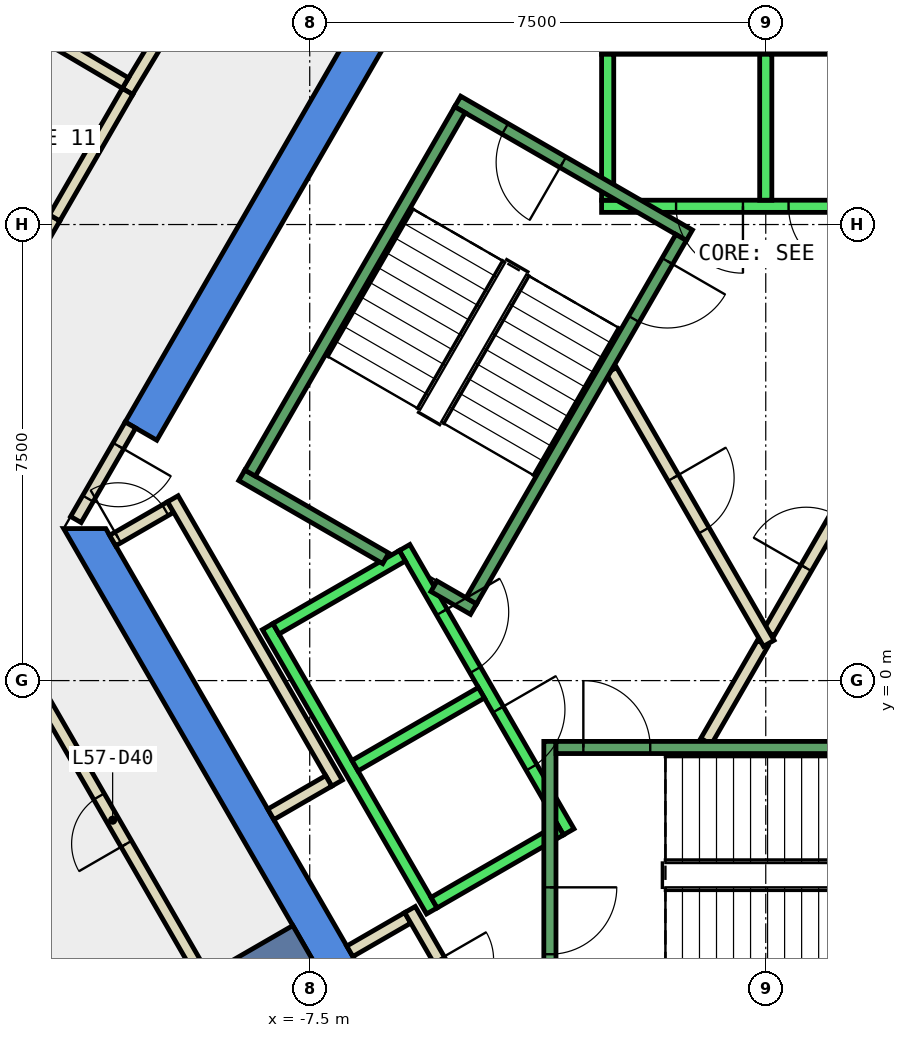
"""IFC4 building model, lengths in metres.
Left out: names, types, materials, properties, quantities, classifications, styles, units other than length and angle.
Written with IfcOpenShell. Run it as: python <this file> out.ifc"""

import sys

from ifc_helpers import new_model, si_unit, direction, frame, frame_2d, origin, place, context, subcontext, project, spatial, polyline, rectangle, outline, extrude, element, fill, save


model = new_model("IFC4")
c1 = context("Model", 3, precision=1e-05, world=origin(), true_north=direction((0.0, 1.0)))
c2 = subcontext(c1, "Body", "Model", "MODEL_VIEW")
j1 = project(units=[si_unit("LENGTHUNIT", "METRE"), si_unit("PLANEANGLEUNIT", "RADIAN")], contexts=[c1])
p1 = place(None, origin())
s1 = spatial("IfcSite", under=j1, at=p1, CompositionType="ELEMENT")
p2 = place(p1, origin())
s2 = spatial("IfcBuilding", under=s1, at=p2, CompositionType="ELEMENT")
p3 = place(p2, frame((0.0, 0.0, 252.2)))
s3 = spatial("IfcBuildingStorey", under=s2, at=p3, CompositionType="ELEMENT", Elevation=252.2)
p4 = place(p3, frame((0.0, 0.0, -0.34)))
e1 = element("IfcWall", 1, at=p4, inside=s3, PredefinedType="SHEAR", context=c2, shape_type="SweptSolid", body=[
    extrude(outline(polyline([(-10.535, 4.253), (-10.015, 3.953), (-5.427, 11.9), (-5.774, 12.5), (-10.535, 4.253)])), origin(), (0.0, 0.0, 1.0), 3.6),
])
p5 = place(p3, frame((0.0, 0.0, -0.34)))
e2 = element("IfcWall", 2, at=p5, inside=s3, PredefinedType="SHEAR", context=c2, shape_type="SweptSolid", body=[
    extrude(outline(polyline([(-11.547, 2.5), (-5.774, -7.5), (-5.427, -6.9), (-10.854, 2.5), (-11.547, 2.5)])), origin(), (0.0, 0.0, 1.0), 3.6),
])
p6 = place(p3, frame((-7.578, -4.375, -0.34), z_axis=(0.0, 0.0, 1.0), x_axis=(-0.866024315419, -0.5000018851, 0.0)))
e3 = element("IfcWall", 3, at=p6, inside=s3, PredefinedType="SHEAR", context=c2, shape_type="SweptSolid", body=[
    extrude(rectangle(XDim=9.0, YDim=0.8, at=frame_2d((4.5, 0.0))), origin(), (0.0, 0.0, 1.0), 3.6),
])
p7 = place(p3, frame((-10.498, 9.689, 0.0), z_axis=(0.0, 0.0, 1.0), x_axis=(0.516353342298, 0.856375633643, 0.0)))
e4 = element("IfcWall", 4, at=p7, inside=s3, PredefinedType="PARTITIONING", context=c2, shape_type="SweptSolid", body=[
    extrude(rectangle(XDim=4.288, YDim=0.2, at=frame_2d((2.144, 0.0))), origin(), (0.0, 0.0, 1.0), 3.26),
])
p8 = place(p7, frame((1.694, 0.0, 0.0)))
e5 = element("IfcOpeningElement", 5, at=p8, cuts=e4, PredefinedType="OPENING", context=c2, shape_type="SweptSolid", body=[
    extrude(rectangle(XDim=1.0, YDim=2.1, at=frame_2d((0.5, 1.05))), frame((0.0, 0.11, 0.0), z_axis=(0.0, -1.0, 0.0), x_axis=(1.0, 0.0, 0.0)), (0.0, 0.0, 1.0), 0.22),
])
p9 = place(p3, frame((-13.652, 4.224, 0.0), z_axis=(0.0, 0.0, 1.0), x_axis=(0.500221427001, 0.865897525097, 0.0)))
e6 = element("IfcWall", 6, at=p9, inside=s3, PredefinedType="PARTITIONING", context=c2, shape_type="SweptSolid", body=[
    extrude(rectangle(XDim=3.91, YDim=0.2, at=frame_2d((1.955, 0.0))), origin(), (0.0, 0.0, 1.0), 3.26),
])
p10 = place(p9, frame((1.505, 0.0, 0.0)))
e7 = element("IfcOpeningElement", 7, at=p10, cuts=e6, PredefinedType="OPENING", context=c2, shape_type="SweptSolid", body=[
    extrude(rectangle(XDim=1.0, YDim=2.1, at=frame_2d((0.5, 1.05))), frame((0.0, 0.11, 0.0), z_axis=(0.0, -1.0, 0.0), x_axis=(1.0, 0.0, 0.0)), (0.0, 0.0, 1.0), 0.22),
])
p11 = place(p3, frame((-11.696, 7.61, 0.0), z_axis=(0.0, 0.0, 1.0), x_axis=(0.500089422704, 0.865973769406, 0.0)))
e8 = element("IfcWall", 8, at=p11, inside=s3, PredefinedType="PARTITIONING", context=c2, shape_type="SweptSolid", body=[
    extrude(rectangle(XDim=2.399, YDim=0.2, at=frame_2d((1.2, 0.0))), origin(), (0.0, 0.0, 1.0), 3.26),
])
p12 = place(p3, frame((-10.741, 2.303, 0.0), z_axis=(0.0, 0.0, 1.0), x_axis=(0.866063652425, 0.499933745558, 0.0)))
e9 = element("IfcWall", 9, at=p12, inside=s3, PredefinedType="PARTITIONING", context=c2, shape_type="SweptSolid", body=[
    extrude(rectangle(XDim=1.1, YDim=0.2, at=frame_2d((0.55, 0.0))), origin(), (0.0, 0.0, 1.0), 3.26),
])
p13 = place(p12, frame((0.1, 0.0, 0.0)))
e10 = element("IfcOpeningElement", 10, at=p13, cuts=e9, PredefinedType="OPENING", context=c2, shape_type="SweptSolid", body=[
    extrude(rectangle(XDim=0.9, YDim=2.1, at=frame_2d((0.45, 1.05))), frame((0.0, 0.11, 0.0), z_axis=(0.0, -1.0, 0.0), x_axis=(1.0, 0.0, 0.0)), (0.0, 0.0, 1.0), 0.22),
])
p14 = place(p3, frame((-9.751, 2.99, 0.0), z_axis=(0.0, 0.0, 1.0), x_axis=(0.499955951776, -0.866050833545, 0.0)))
e11 = element("IfcWall", 11, at=p14, inside=s3, PredefinedType="PARTITIONING", context=c2, shape_type="SweptSolid", body=[
    extrude(rectangle(XDim=5.4, YDim=0.2, at=frame_2d((2.7, 0.0))), origin(), (0.0, 0.0, 1.0), 3.26),
])
p15 = place(p3, frame((-7.188, -1.65, 0.0), z_axis=(0.0, 0.0, 1.0), x_axis=(-0.865841558281, -0.500318294642, 0.0)))
e12 = element("IfcWall", 12, at=p15, inside=s3, PredefinedType="PARTITIONING", context=c2, shape_type="SweptSolid", body=[
    extrude(rectangle(XDim=1.099, YDim=0.2, at=frame_2d((0.55, 0.0))), origin(), (0.0, 0.0, 1.0), 3.26),
])
p16 = place(p3, frame((-6.841, -4.452, 0.0), z_axis=(0.0, 0.0, 1.0), x_axis=(0.86621513555, 0.499671230855, 0.0)))
e13 = element("IfcWall", 13, at=p16, inside=s3, PredefinedType="PARTITIONING", context=c2, shape_type="SweptSolid", body=[
    extrude(rectangle(XDim=1.1, YDim=0.2, at=frame_2d((0.55, 0.0))), origin(), (0.0, 0.0, 1.0), 3.26),
])
p17 = place(p3, frame((-5.851, -3.765, 0.0), z_axis=(0.0, 0.0, 1.0), x_axis=(0.500011755427, -0.866018616679, 0.0)))
e14 = element("IfcWall", 14, at=p17, inside=s3, PredefinedType="PARTITIONING", context=c2, shape_type="SweptSolid", body=[
    extrude(rectangle(XDim=2.8, YDim=0.2, at=frame_2d((1.4, 0.0))), origin(), (0.0, 0.0, 1.0), 3.26),
])
p18 = place(p17, frame((0.95, 0.0, 0.0)))
e15 = element("IfcOpeningElement", 15, at=p18, cuts=e14, PredefinedType="OPENING", context=c2, shape_type="SweptSolid", body=[
    extrude(rectangle(XDim=0.9, YDim=2.1, at=frame_2d((0.45, 1.05))), frame((0.0, 0.11, 0.0), z_axis=(0.0, -1.0, 0.0), x_axis=(1.0, 0.0, 0.0)), (0.0, 0.0, 1.0), 0.22),
])
p19 = place(p3, frame((-0.982, -1.0, 0.0), z_axis=(0.0, 0.0, 1.0), x_axis=(0.50024047865, 0.865886518847, 0.0)))
e16 = element("IfcWall", 16, at=p19, inside=s3, PredefinedType="PARTITIONING", context=c2, shape_type="SweptSolid", body=[
    extrude(rectangle(XDim=1.863, YDim=0.2, at=frame_2d((0.931, 0.0))), origin(), (0.0, 0.0, 1.0), 3.26),
])
p20 = place(p3, frame((0.05, 0.787, 0.0), z_axis=(0.0, 0.0, 1.0), x_axis=(0.499954076797, 0.866051915934, 0.0)))
e17 = element("IfcWall", 17, at=p20, inside=s3, PredefinedType="PARTITIONING", context=c2, shape_type="SweptSolid", body=[
    extrude(rectangle(XDim=3.558, YDim=0.2, at=frame_2d((1.779, 0.0))), origin(), (0.0, 0.0, 1.0), 3.26),
])
p21 = place(p20, frame((1.229, 0.0, 0.0)))
e18 = element("IfcOpeningElement", 18, at=p21, cuts=e17, PredefinedType="OPENING", context=c2, shape_type="SweptSolid", body=[
    extrude(rectangle(XDim=1.0, YDim=2.1, at=frame_2d((0.5, 1.05))), frame((0.0, 0.11, 0.0), z_axis=(0.0, -1.0, 0.0), x_axis=(1.0, 0.0, 0.0)), (0.0, 0.0, 1.0), 0.22),
])
p22 = place(p3, frame((-2.54, 5.1, 0.0), z_axis=(0.0, 0.0, 1.0), x_axis=(0.499925051871, -0.866068670783, 0.0)))
e19 = element("IfcWall", 19, at=p22, inside=s3, PredefinedType="PARTITIONING", context=c2, shape_type="SweptSolid", body=[
    extrude(rectangle(XDim=5.181, YDim=0.2, at=frame_2d((2.59, 0.0))), origin(), (0.0, 0.0, 1.0), 3.26),
])
p23 = place(p22, frame((2.04, 0.0, 0.0)))
e20 = element("IfcOpeningElement", 20, at=p23, cuts=e19, PredefinedType="OPENING", context=c2, shape_type="SweptSolid", body=[
    extrude(rectangle(XDim=1.0, YDim=2.1, at=frame_2d((0.5, 1.05))), frame((0.0, 0.11, 0.0), z_axis=(0.0, -1.0, 0.0), x_axis=(1.0, 0.0, 0.0)), (0.0, 0.0, 1.0), 0.22),
])
p24 = place(p3, frame((-10.532, 9.826, 0.0), z_axis=(0.0, 0.0, 1.0), x_axis=(-0.861311086958, 0.508077958077, 0.0)))
e21 = element("IfcWall", 21, at=p24, inside=s3, PredefinedType="PARTITIONING", context=c2, shape_type="SweptSolid", body=[
    extrude(rectangle(XDim=2.299, YDim=0.2, at=frame_2d((1.149, 0.0))), origin(), (0.0, 0.0, 1.0), 3.26),
])
p25 = place(p3, frame((-10.449, 4.203, 0.0), z_axis=(0.0, 0.0, 1.0), x_axis=(-0.499914839587, -0.866074565589, 0.0)))
e22 = element("IfcWall", 22, at=p25, inside=s3, PredefinedType="PARTITIONING", context=c2, shape_type="SweptSolid", body=[
    extrude(rectangle(XDim=1.794, YDim=0.2, at=frame_2d((0.897, 0.0))), origin(), (0.0, 0.0, 1.0), 2.4),
])
p26 = place(p25, frame((0.397, 0.0, 0.0)))
e23 = element("IfcOpeningElement", 23, at=p26, cuts=e22, PredefinedType="OPENING", context=c2, shape_type="SweptSolid", body=[
    extrude(rectangle(XDim=1.0, YDim=2.1, at=frame_2d((0.5, 1.05))), frame((0.0, 0.11, 0.0), z_axis=(0.0, -1.0, 0.0), x_axis=(1.0, 0.0, 0.0)), (0.0, 0.0, 1.0), 0.22),
])
p27 = place(p3, frame((-9.25, -4.879, 0.0), z_axis=(0.0, 0.0, 1.0), x_axis=(-0.499944124422, 0.866057661161, 0.0)))
e24 = element("IfcWall", 24, at=p27, inside=s3, PredefinedType="PARTITIONING", context=c2, shape_type="SweptSolid", body=[
    extrude(rectangle(XDim=7.405, YDim=0.2, at=frame_2d((3.702, 0.0))), origin(), (0.0, 0.0, 1.0), 3.26),
])
p28 = place(p27, frame((2.533, 0.0, 0.0)))
e25 = element("IfcOpeningElement", 25, at=p28, cuts=e24, PredefinedType="OPENING", context=c2, shape_type="SweptSolid", body=[
    extrude(rectangle(XDim=0.9, YDim=2.1, at=frame_2d((0.45, 1.05))), frame((0.0, 0.11, 0.0), z_axis=(0.0, -1.0, 0.0), x_axis=(1.0, 0.0, 0.0)), (0.0, 0.0, 1.0), 0.22),
])
p29 = place(p3, frame((2.7, 7.8, 0.0), z_axis=(0.0, 0.0, 1.0), x_axis=(-1.0, 0.0, 0.0)))
e26 = element("IfcWall", 26, at=p29, inside=s3, PredefinedType="STANDARD", context=c2, shape_type="SweptSolid", body=[
    extrude(rectangle(XDim=5.4, YDim=0.2, at=frame_2d((2.7, 0.0))), origin(), (0.0, 0.0, 1.0), 3.26),
])
p30 = place(p29, frame((1.225, 0.0, 0.0)))
e27 = element("IfcOpeningElement", 27, at=p30, cuts=e26, PredefinedType="OPENING", context=c2, shape_type="SweptSolid", body=[
    extrude(rectangle(XDim=1.1, YDim=2.1, at=frame_2d((0.55, 1.05))), frame((0.0, 0.11, 0.0), z_axis=(0.0, -1.0, 0.0), x_axis=(1.0, 0.0, 0.0)), (0.0, 0.0, 1.0), 0.22),
])
p31 = place(p29, frame((3.075, 0.0, 0.0)))
e28 = element("IfcOpeningElement", 28, at=p31, cuts=e26, PredefinedType="OPENING", context=c2, shape_type="SweptSolid", body=[
    extrude(rectangle(XDim=1.1, YDim=2.1, at=frame_2d((0.55, 1.05))), frame((0.0, 0.11, 0.0), z_axis=(0.0, -1.0, 0.0), x_axis=(1.0, 0.0, 0.0)), (0.0, 0.0, 1.0), 0.22),
])
p32 = place(p3, frame((2.7, 10.4, 0.0), z_axis=(0.0, 0.0, 1.0), x_axis=(-1.0, 0.0, 0.0)))
e29 = element("IfcWall", 29, at=p32, inside=s3, PredefinedType="STANDARD", context=c2, shape_type="SweptSolid", body=[
    extrude(rectangle(XDim=5.4, YDim=0.2, at=frame_2d((2.7, 0.0))), origin(), (0.0, 0.0, 1.0), 3.26),
])
for number, where, z_axis, x_axis in (
    (30, (0.0, 7.9, 0.0), (0.0, 0.0, 1.0), (0.0, 1.0, 0.0)),
    (31, (-2.6, 7.9, 0.0), (0.0, 0.0, 1.0), (0.0, 1.0, 0.0)),
):
    element("IfcWall", number, at=place(p3, frame(where, z_axis=z_axis, x_axis=x_axis)), inside=s3, PredefinedType="STANDARD", context=c2, shape_type="SweptSolid", body=[
        extrude(rectangle(XDim=2.4, YDim=0.2, at=frame_2d((1.2, 0.0))), origin(), (0.0, 0.0, 1.0), 3.26),
    ])
p33 = place(p3, frame((-5.94, 2.188, 0.0), z_axis=(0.0, 0.0, 1.0), x_axis=(0.500034260056, -0.866005622828, 0.0)))
e32 = element("IfcWall", 32, at=p33, inside=s3, PredefinedType="STANDARD", context=c2, shape_type="SweptSolid", body=[
    extrude(rectangle(XDim=5.399, YDim=0.2, at=frame_2d((2.7, 0.0))), origin(), (0.0, 0.0, 1.0), 3.26),
])
p34 = place(p33, frame((3.075, 0.0, 0.0)))
e33 = element("IfcOpeningElement", 33, at=p34, cuts=e32, PredefinedType="OPENING", context=c2, shape_type="SweptSolid", body=[
    extrude(rectangle(XDim=1.1, YDim=2.1, at=frame_2d((0.55, 1.05))), frame((0.0, 0.11, 0.0), z_axis=(0.0, -1.0, 0.0), x_axis=(1.0, 0.0, 0.0)), (0.0, 0.0, 1.0), 0.22),
])
p35 = place(p33, frame((1.225, 0.0, 0.0)))
e34 = element("IfcOpeningElement", 34, at=p35, cuts=e32, PredefinedType="OPENING", context=c2, shape_type="SweptSolid", body=[
    extrude(rectangle(XDim=1.1, YDim=2.1, at=frame_2d((0.55, 1.05))), frame((0.0, 0.11, 0.0), z_axis=(0.0, -1.0, 0.0), x_axis=(1.0, 0.0, 0.0)), (0.0, 0.0, 1.0), 0.22),
])
p36 = place(p3, frame((-8.192, 0.888, 0.0), z_axis=(0.0, 0.0, 1.0), x_axis=(0.500034260056, -0.866005622828, 0.0)))
e35 = element("IfcWall", 35, at=p36, inside=s3, PredefinedType="STANDARD", context=c2, shape_type="SweptSolid", body=[
    extrude(rectangle(XDim=5.399, YDim=0.2, at=frame_2d((2.7, 0.0))), origin(), (0.0, 0.0, 1.0), 3.26),
])
for number, where, z_axis, x_axis in (
    (36, (-5.977, 2.052, 0.0), (0.0, 0.0, 1.0), (-0.866, -0.5, 0.0)),
    (37, (-4.677, -0.2, 0.0), (0.0, 0.0, 1.0), (-0.866, -0.5, 0.0)),
):
    element("IfcWall", number, at=place(p3, frame(where, z_axis=z_axis, x_axis=x_axis)), inside=s3, PredefinedType="STANDARD", context=c2, shape_type="SweptSolid", body=[
        extrude(rectangle(XDim=2.399, YDim=0.2, at=frame_2d((1.2, 0.0))), origin(), (0.0, 0.0, 1.0), 3.26),
    ])
p37 = place(p3, frame((-3.377, -2.452, 0.0), z_axis=(0.0, 0.0, 1.0), x_axis=(-0.865955154139, -0.50012165622, 0.0)))
e38 = element("IfcWall", 38, at=p37, inside=s3, PredefinedType="STANDARD", context=c2, shape_type="SweptSolid", body=[
    extrude(rectangle(XDim=2.4, YDim=0.2, at=frame_2d((1.2, 0.0))), origin(), (0.0, 0.0, 1.0), 3.26),
])
p38 = place(p3, frame((-3.55, -1.0, 0.0), z_axis=(0.0, 0.0, 1.0), x_axis=(0.0, -1.0, 0.0)))
e39 = element("IfcWall", 39, at=p38, inside=s3, PredefinedType="STANDARD", context=c2, shape_type="SweptSolid", body=[
    extrude(rectangle(XDim=4.4, YDim=0.2, at=frame_2d((2.2, 0.0))), origin(), (0.0, 0.0, 1.0), 3.26),
])
p39 = place(p38, frame((2.4, 0.0, 0.0)))
e40 = element("IfcOpeningElement", 40, at=p39, cuts=e39, PredefinedType="OPENING", context=c2, shape_type="SweptSolid", body=[
    extrude(rectangle(XDim=1.1, YDim=2.2, at=frame_2d((0.55, 1.1))), frame((0.0, 0.11, 0.0), z_axis=(0.0, -1.0, 0.0), x_axis=(1.0, 0.0, 0.0)), (0.0, 0.0, 1.0), 0.22),
])
p40 = place(p3, frame((-3.45, -1.1, 0.0), z_axis=(0.0, 0.0, 1.0), x_axis=(1.0, 0.0, 0.0)))
e41 = element("IfcWall", 41, at=p40, inside=s3, PredefinedType="STANDARD", context=c2, shape_type="SweptSolid", body=[
    extrude(rectangle(XDim=6.9, YDim=0.2, at=frame_2d((3.45, 0.0))), origin(), (0.0, 0.0, 1.0), 3.26),
])
p41 = place(p40, frame((0.45, 0.0, 0.0)))
e42 = element("IfcOpeningElement", 42, at=p41, cuts=e41, PredefinedType="OPENING", context=c2, shape_type="SweptSolid", body=[
    extrude(rectangle(XDim=1.1, YDim=2.2, at=frame_2d((0.55, 1.1))), frame((0.0, 0.11, 0.0), z_axis=(0.0, -1.0, 0.0), x_axis=(1.0, 0.0, 0.0)), (0.0, 0.0, 1.0), 0.22),
])
p42 = place(p3, frame((-1.256, 7.324, 0.0), z_axis=(0.0, 0.0, 1.0), x_axis=(-0.866046073146, 0.499964197906, 0.0)))
e43 = element("IfcWall", 43, at=p42, inside=s3, PredefinedType="STANDARD", context=c2, shape_type="SweptSolid", body=[
    extrude(rectangle(XDim=4.4, YDim=0.2, at=frame_2d((2.2, 0.0))), origin(), (0.0, 0.0, 1.0), 3.26),
])
p43 = place(p42, frame((2.4, 0.0, 0.0)))
e44 = element("IfcOpeningElement", 44, at=p43, cuts=e43, PredefinedType="OPENING", context=c2, shape_type="SweptSolid", body=[
    extrude(rectangle(XDim=1.1, YDim=2.2, at=frame_2d((0.55, 1.1))), frame((0.0, 0.11, 0.0), z_axis=(0.0, -1.0, 0.0), x_axis=(1.0, 0.0, 0.0)), (0.0, 0.0, 1.0), 0.22),
])
p44 = place(p3, frame((-6.25, 2.01, 0.0), z_axis=(0.0, 0.0, 1.0), x_axis=(-0.86611865017, 0.499838457731, 0.0)))
e45 = element("IfcWall", 45, at=p44, inside=s3, PredefinedType="STANDARD", context=c2, shape_type="SweptSolid", body=[
    extrude(rectangle(XDim=2.733, YDim=0.2, at=frame_2d((1.366, 0.0))), origin(), (0.0, 0.0, 1.0), 3.26),
])
p45 = place(p3, frame((-4.806, 1.176, 0.0), z_axis=(0.0, 0.0, 1.0), x_axis=(-0.866558586415, 0.499075361355, 0.0)))
e46 = element("IfcWall", 46, at=p45, inside=s3, PredefinedType="STANDARD", context=c2, shape_type="SweptSolid", body=[
    extrude(rectangle(XDim=0.751, YDim=0.2, at=frame_2d((0.376, 0.0))), origin(), (0.0, 0.0, 1.0), 3.26),
])
p46 = place(p3, frame((-1.393, 7.288, 0.0), z_axis=(0.0, 0.0, 1.0), x_axis=(-0.499963383562, -0.866046543262, 0.0)))
e47 = element("IfcWall", 47, at=p46, inside=s3, PredefinedType="STANDARD", context=c2, shape_type="SweptSolid", body=[
    extrude(rectangle(XDim=6.9, YDim=0.2, at=frame_2d((3.45, 0.0))), origin(), (0.0, 0.0, 1.0), 3.26),
])
p47 = place(p46, frame((0.45, 0.0, 0.0)))
e48 = element("IfcOpeningElement", 48, at=p47, cuts=e47, PredefinedType="OPENING", context=c2, shape_type="SweptSolid", body=[
    extrude(rectangle(XDim=1.1, YDim=2.2, at=frame_2d((0.55, 1.1))), frame((0.0, 0.11, 0.0), z_axis=(0.0, -1.0, 0.0), x_axis=(1.0, 0.0, 0.0)), (0.0, 0.0, 1.0), 0.22),
])
p48 = place(p3, frame((-5.03, 9.388, 0.0), z_axis=(0.0, 0.0, 1.0), x_axis=(-0.499978703459, -0.866037698999, 0.0)))
e49 = element("IfcWall", 49, at=p48, inside=s3, PredefinedType="STANDARD", context=c2, shape_type="SweptSolid", body=[
    extrude(rectangle(XDim=6.9, YDim=0.2, at=frame_2d((3.45, 0.0))), origin(), (0.0, 0.0, 1.0), 3.26),
])
p49 = place(p28, origin())
e50 = element("IfcDoor", 50, at=p49, inside=s3, OperationType="SINGLE_SWING_RIGHT", PredefinedType="DOOR", context=c2, shape_type="SweptSolid", body=[
    extrude(rectangle(XDim=0.9, YDim=2.1, at=frame_2d((0.45, 1.05))), frame((0.0, 0.025, 0.0), z_axis=(0.0, -1.0, 0.0), x_axis=(1.0, 0.0, 0.0)), (0.0, 0.0, 1.0), 0.05),
])
fill(e25, e50)
p50 = place(p21, origin())
e51 = element("IfcDoor", 51, at=p50, inside=s3, OperationType="SINGLE_SWING_RIGHT", PredefinedType="DOOR", context=c2, shape_type="SweptSolid", body=[
    extrude(rectangle(XDim=1.0, YDim=2.1, at=frame_2d((0.5, 1.05))), frame((0.0, 0.025, 0.0), z_axis=(0.0, -1.0, 0.0), x_axis=(1.0, 0.0, 0.0)), (0.0, 0.0, 1.0), 0.05),
])
fill(e18, e51)
p51 = place(p23, origin())
e52 = element("IfcDoor", 52, at=p51, inside=s3, OperationType="SINGLE_SWING_RIGHT", PredefinedType="DOOR", context=c2, shape_type="SweptSolid", body=[
    extrude(rectangle(XDim=1.0, YDim=2.1, at=frame_2d((0.5, 1.05))), frame((0.0, 0.025, 0.0), z_axis=(0.0, -1.0, 0.0), x_axis=(1.0, 0.0, 0.0)), (0.0, 0.0, 1.0), 0.05),
])
fill(e20, e52)
p52 = place(p13, origin())
e53 = element("IfcDoor", 53, at=p52, inside=s3, OperationType="SINGLE_SWING_RIGHT", PredefinedType="DOOR", context=c2, shape_type="SweptSolid", body=[
    extrude(rectangle(XDim=0.9, YDim=2.1, at=frame_2d((0.45, 1.05))), frame((0.0, 0.025, 0.0), z_axis=(0.0, -1.0, 0.0), x_axis=(1.0, 0.0, 0.0)), (0.0, 0.0, 1.0), 0.05),
])
fill(e10, e53)
p53 = place(p26, origin())
e54 = element("IfcDoor", 54, at=p53, inside=s3, OperationType="SINGLE_SWING_LEFT", PredefinedType="DOOR", context=c2, shape_type="SweptSolid", body=[
    extrude(rectangle(XDim=1.0, YDim=2.1, at=frame_2d((0.5, 1.05))), frame((0.0, 0.025, 0.0), z_axis=(0.0, -1.0, 0.0), x_axis=(1.0, 0.0, 0.0)), (0.0, 0.0, 1.0), 0.05),
])
fill(e23, e54)
p54 = place(p30, origin())
e55 = element("IfcDoor", 55, at=p54, inside=s3, OperationType="SLIDING_TO_LEFT", PredefinedType="DOOR", context=c2, shape_type="SweptSolid", body=[
    extrude(rectangle(XDim=1.1, YDim=2.1, at=frame_2d((0.55, 1.05))), frame((0.0, 0.025, 0.0), z_axis=(0.0, -1.0, 0.0), x_axis=(1.0, 0.0, 0.0)), (0.0, 0.0, 1.0), 0.05),
])
fill(e27, e55)
p55 = place(p31, origin())
e56 = element("IfcDoor", 56, at=p55, inside=s3, OperationType="SLIDING_TO_LEFT", PredefinedType="DOOR", context=c2, shape_type="SweptSolid", body=[
    extrude(rectangle(XDim=1.1, YDim=2.1, at=frame_2d((0.55, 1.05))), frame((0.0, 0.025, 0.0), z_axis=(0.0, -1.0, 0.0), x_axis=(1.0, 0.0, 0.0)), (0.0, 0.0, 1.0), 0.05),
])
fill(e28, e56)
p56 = place(p34, origin())
e57 = element("IfcDoor", 57, at=p56, inside=s3, OperationType="SLIDING_TO_LEFT", PredefinedType="DOOR", context=c2, shape_type="SweptSolid", body=[
    extrude(rectangle(XDim=1.1, YDim=2.1, at=frame_2d((0.55, 1.05))), frame((0.0, 0.025, 0.0), z_axis=(0.0, -1.0, 0.0), x_axis=(1.0, 0.0, 0.0)), (0.0, 0.0, 1.0), 0.05),
])
fill(e33, e57)
p57 = place(p35, origin())
e58 = element("IfcDoor", 58, at=p57, inside=s3, OperationType="SLIDING_TO_LEFT", PredefinedType="DOOR", context=c2, shape_type="SweptSolid", body=[
    extrude(rectangle(XDim=1.1, YDim=2.1, at=frame_2d((0.55, 1.05))), frame((0.0, 0.025, 0.0), z_axis=(0.0, -1.0, 0.0), x_axis=(1.0, 0.0, 0.0)), (0.0, 0.0, 1.0), 0.05),
])
fill(e34, e58)
p58 = place(p41, origin())
e59 = element("IfcDoor", 59, at=p58, inside=s3, OperationType="SINGLE_SWING_LEFT", PredefinedType="DOOR", context=c2, shape_type="SweptSolid", body=[
    extrude(rectangle(XDim=1.1, YDim=2.2, at=frame_2d((0.55, 1.1))), frame((0.0, 0.025, 0.0), z_axis=(0.0, -1.0, 0.0), x_axis=(1.0, 0.0, 0.0)), (0.0, 0.0, 1.0), 0.05),
])
fill(e42, e59)
p59 = place(p39, origin())
e60 = element("IfcDoor", 60, at=p59, inside=s3, OperationType="SINGLE_SWING_LEFT", PredefinedType="DOOR", context=c2, shape_type="SweptSolid", body=[
    extrude(rectangle(XDim=1.1, YDim=2.2, at=frame_2d((0.55, 1.1))), frame((0.0, 0.025, 0.0), z_axis=(0.0, -1.0, 0.0), x_axis=(1.0, 0.0, 0.0)), (0.0, 0.0, 1.0), 0.05),
])
fill(e40, e60)
p60 = place(p47, origin())
e61 = element("IfcDoor", 61, at=p60, inside=s3, OperationType="SINGLE_SWING_LEFT", PredefinedType="DOOR", context=c2, shape_type="SweptSolid", body=[
    extrude(rectangle(XDim=1.1, YDim=2.2, at=frame_2d((0.55, 1.1))), frame((0.0, 0.025, 0.0), z_axis=(0.0, -1.0, 0.0), x_axis=(1.0, 0.0, 0.0)), (0.0, 0.0, 1.0), 0.05),
])
fill(e48, e61)
p61 = place(p43, origin())
e62 = element("IfcDoor", 62, at=p61, inside=s3, OperationType="SINGLE_SWING_LEFT", PredefinedType="DOOR", context=c2, shape_type="SweptSolid", body=[
    extrude(rectangle(XDim=1.1, YDim=2.2, at=frame_2d((0.55, 1.1))), frame((0.0, 0.025, 0.0), z_axis=(0.0, -1.0, 0.0), x_axis=(1.0, 0.0, 0.0)), (0.0, 0.0, 1.0), 0.05),
])
fill(e44, e62)
save(model, sys.argv[1])
